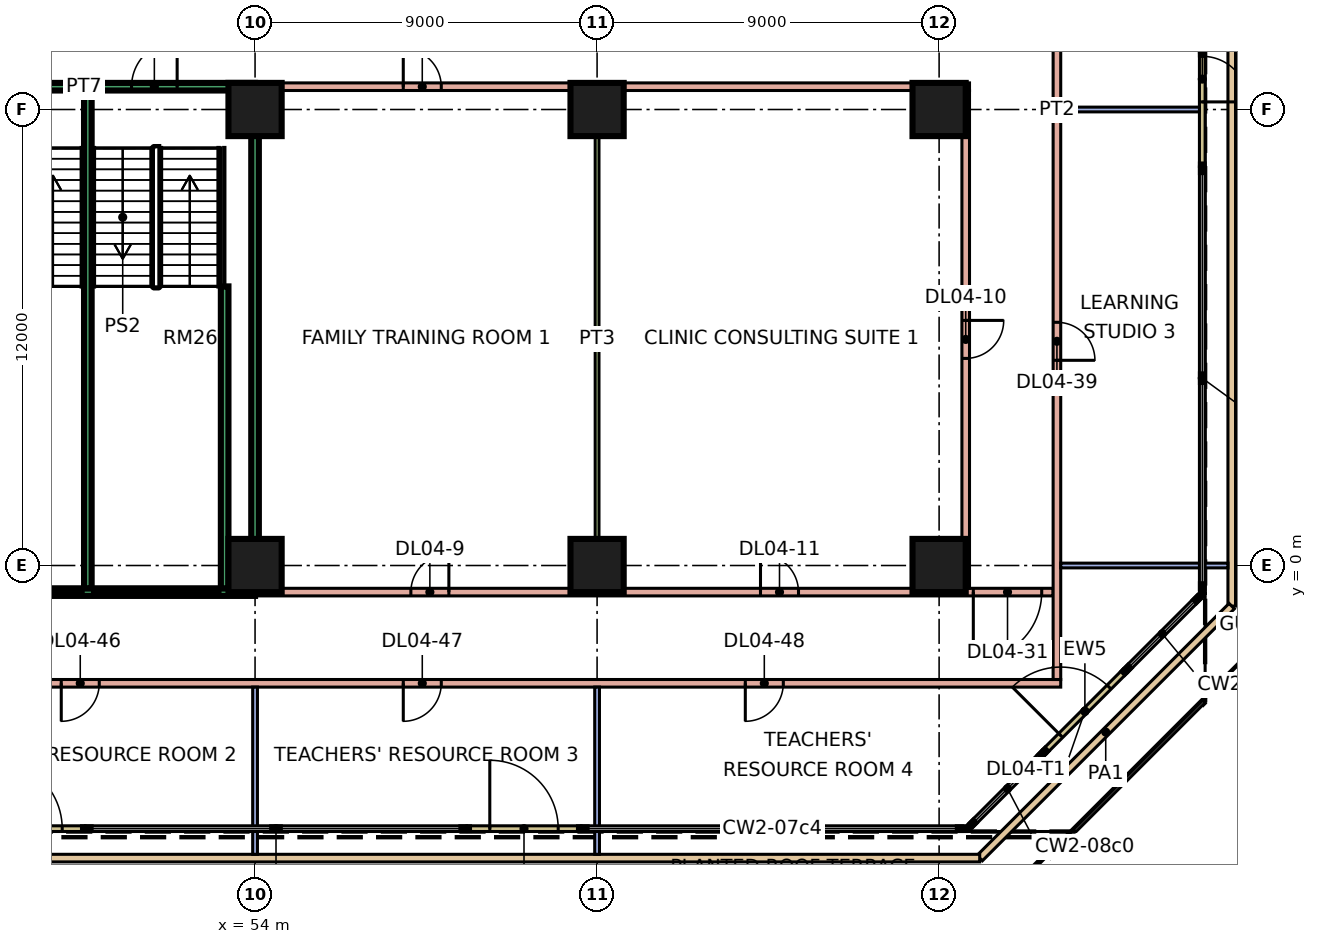
"""IFC4 building model, lengths in metres.
Left out: names, types, materials, properties, quantities, classifications, styles, units other than length and angle.
Written with IfcOpenShell. Run it as: python <this file> out.ifc"""

import sys

from ifc_helpers import new_model, si_unit, direction, frame, frame_2d, origin, origin_2d, place, context, subcontext, project, spatial, rectangle, extrude, element, fill, save


model = new_model("IFC4")
c1 = context("Model", 3, precision=1e-05, world=origin(), true_north=direction((0.0, 1.0)))
c2 = subcontext(c1, "Body", "Model", "MODEL_VIEW")
j1 = project(units=[si_unit("LENGTHUNIT", "METRE"), si_unit("PLANEANGLEUNIT", "RADIAN")], contexts=[c1])
p1 = place(None, origin())
s1 = spatial("IfcSite", under=j1, at=p1, CompositionType="ELEMENT")
p2 = place(p1, origin())
s2 = spatial("IfcBuilding", under=s1, at=p2, CompositionType="ELEMENT")
p3 = place(p2, frame((0.0, 0.0, 21.6)))
s3 = spatial("IfcBuildingStorey", under=s2, at=p3, CompositionType="ELEMENT", Elevation=21.6)
for number, where, z_axis, x_axis in (
    (1, (54.0, 0.0, 0.0), (0.0, 0.0, 1.0), (1.0, 0.0, 0.0)),
    (2, (63.0, 0.0, 0.0), (0.0, 0.0, 1.0), (1.0, 0.0, 0.0)),
    (3, (72.0, 0.0, 0.0), (0.0, 0.0, 1.0), (1.0, 0.0, 0.0)),
    (4, (54.0, 12.0, 0.0), (0.0, 0.0, 1.0), (1.0, 0.0, 0.0)),
    (5, (63.0, 12.0, 0.0), (0.0, 0.0, 1.0), (1.0, 0.0, 0.0)),
    (6, (72.0, 12.0, 0.0), (0.0, 0.0, 1.0), (1.0, 0.0, 0.0)),
):
    element("IfcColumn", number, at=place(p3, frame(where, z_axis=z_axis, x_axis=x_axis)), inside=s3, PredefinedType="COLUMN", context=c2, shape_type="SweptSolid", body=[
        extrude(rectangle(XDim=1.4, YDim=1.4, at=origin_2d()), origin(), (0.0, 0.0, 1.0), 4.8),
    ])
p4 = place(p3, frame((46.526, -6.925, 0.0), z_axis=(0.0, 0.0, 1.0), x_axis=(1.0, 0.0, 0.0)))
e7 = element("IfcWall", 7, at=p4, inside=s3, PredefinedType="SOLIDWALL", context=c2, shape_type="SweptSolid", body=[
    extrude(rectangle(XDim=3.0, YDim=0.15, at=frame_2d((1.5, 0.0))), origin(), (0.0, 0.0, 1.0), 4.4),
])
p5 = place(p4, frame((0.6, 0.0, 0.0)))
e8 = element("IfcOpeningElement", 8, at=p5, cuts=e7, PredefinedType="OPENING", context=c2, shape_type="SweptSolid", body=[
    extrude(rectangle(XDim=1.8, YDim=2.4, at=frame_2d((0.9, 1.2))), frame((0.0, 0.085, 0.0), z_axis=(0.0, -1.0, 0.0), x_axis=(1.0, 0.0, 0.0)), (0.0, 0.0, 1.0), 0.17),
])
p6 = place(p3, frame((59.577, -6.925, 0.0), z_axis=(0.0, 0.0, 1.0), x_axis=(1.0, 0.0, 0.0)))
e9 = element("IfcWall", 9, at=p6, inside=s3, PredefinedType="SOLIDWALL", context=c2, shape_type="SweptSolid", body=[
    extrude(rectangle(XDim=3.0, YDim=0.15, at=frame_2d((1.5, 0.0))), origin(), (0.0, 0.0, 1.0), 4.4),
])
p7 = place(p6, frame((0.6, 0.0, 0.0)))
e10 = element("IfcOpeningElement", 10, at=p7, cuts=e9, PredefinedType="OPENING", context=c2, shape_type="SweptSolid", body=[
    extrude(rectangle(XDim=1.8, YDim=2.4, at=frame_2d((0.9, 1.2))), frame((0.0, 0.085, 0.0), z_axis=(0.0, -1.0, 0.0), x_axis=(1.0, 0.0, 0.0)), (0.0, 0.0, 1.0), 0.17),
])
p8 = place(p3, frame((74.775, -4.897, 0.0), z_axis=(0.0, 0.0, 1.0), x_axis=(0.707106781187, 0.707106781187, 0.0)))
e11 = element("IfcWall", 11, at=p8, inside=s3, PredefinedType="SOLIDWALL", context=c2, shape_type="SweptSolid", body=[
    extrude(rectangle(XDim=3.0, YDim=0.15, at=frame_2d((1.5, 0.0))), origin(), (0.0, 0.0, 1.0), 4.4),
])
p9 = place(p8, frame((0.6, 0.0, 0.0)))
e12 = element("IfcOpeningElement", 12, at=p9, cuts=e11, PredefinedType="OPENING", context=c2, shape_type="SweptSolid", body=[
    extrude(rectangle(XDim=1.8, YDim=2.4, at=frame_2d((0.9, 1.2))), frame((0.0, 0.085, 0.0), z_axis=(0.0, -1.0, 0.0), x_axis=(1.0, 0.0, 0.0)), (0.0, 0.0, 1.0), 0.17),
])
p10 = place(p3, frame((78.925, 10.5, 0.0), z_axis=(0.0, 0.0, 1.0), x_axis=(0.0, 1.0, 0.0)))
e13 = element("IfcWall", 13, at=p10, inside=s3, PredefinedType="SOLIDWALL", context=c2, shape_type="SweptSolid", body=[
    extrude(rectangle(XDim=3.0, YDim=0.15, at=frame_2d((1.5, 0.0))), origin(), (0.0, 0.0, 1.0), 4.4),
])
p11 = place(p10, frame((1.7, 0.0, 0.0)))
e14 = element("IfcOpeningElement", 14, at=p11, cuts=e13, PredefinedType="OPENING", context=c2, shape_type="SweptSolid", body=[
    extrude(rectangle(XDim=1.2, YDim=2.4, at=frame_2d((0.6, 1.2))), frame((0.0, 0.085, 0.0), z_axis=(0.0, -1.0, 0.0), x_axis=(1.0, 0.0, 0.0)), (0.0, 0.0, 1.0), 0.17),
])
p12 = place(p3, frame((79.7, 25.068, 0.0), z_axis=(0.0, 0.0, 1.0), x_axis=(0.0, -1.0, 0.0)))
e15 = element("IfcWall", 15, at=p12, inside=s3, PredefinedType="PARAPET", context=c2, shape_type="SweptSolid", body=[
    extrude(rectangle(XDim=26.136, YDim=0.2, at=frame_2d((13.068, 0.0))), origin(), (0.0, 0.0, 1.0), 0.5),
])
p13 = place(p3, frame((79.7, -1.068, 0.0), z_axis=(0.0, 0.0, 1.0), x_axis=(-0.707106781187, -0.707106781187, 0.0)))
e16 = element("IfcWall", 16, at=p13, inside=s3, PredefinedType="PARAPET", context=c2, shape_type="SweptSolid", body=[
    extrude(rectangle(XDim=9.379, YDim=0.2, at=frame_2d((4.689, 0.0))), origin(), (0.0, 0.0, 1.0), 0.5),
])
p14 = place(p3, frame((73.068, -7.7, 0.0), z_axis=(0.0, 0.0, 1.0), x_axis=(-1.0, 0.0, 0.0)))
e17 = element("IfcWall", 17, at=p14, inside=s3, PredefinedType="PARAPET", context=c2, shape_type="SweptSolid", body=[
    extrude(rectangle(XDim=63.136, YDim=0.2, at=frame_2d((31.568, 0.0))), origin(), (0.0, 0.0, 1.0), 0.5),
])
p15 = place(p3, frame((5.473, -3.1, 0.0), z_axis=(0.0, 0.0, 1.0), x_axis=(1.0, 0.0, 0.0)))
e18 = element("IfcWall", 18, at=p15, inside=s3, PredefinedType="PARTITIONING", context=c2, shape_type="SweptSolid", body=[
    extrude(rectangle(XDim=69.727, YDim=0.2, at=frame_2d((34.863, 0.0))), origin(), (0.0, 0.0, 1.0), 4.4),
])
p16 = place(p15, frame((11.927, 0.0, 0.0)))
e19 = element("IfcOpeningElement", 19, at=p16, cuts=e18, PredefinedType="OPENING", context=c2, shape_type="SweptSolid", body=[
    extrude(rectangle(XDim=1.0, YDim=2.1, at=frame_2d((0.5, 1.05))), frame((0.0, 0.11, 0.0), z_axis=(0.0, -1.0, 0.0), x_axis=(1.0, 0.0, 0.0)), (0.0, 0.0, 1.0), 0.22),
])
p17 = place(p15, frame((23.927, 0.0, 0.0)))
e20 = element("IfcOpeningElement", 20, at=p17, cuts=e18, PredefinedType="OPENING", context=c2, shape_type="SweptSolid", body=[
    extrude(rectangle(XDim=1.0, YDim=2.1, at=frame_2d((0.5, 1.05))), frame((0.0, 0.11, 0.0), z_axis=(0.0, -1.0, 0.0), x_axis=(1.0, 0.0, 0.0)), (0.0, 0.0, 1.0), 0.22),
])
p18 = place(p15, frame((34.427, 0.0, 0.0)))
e21 = element("IfcOpeningElement", 21, at=p18, cuts=e18, PredefinedType="OPENING", context=c2, shape_type="SweptSolid", body=[
    extrude(rectangle(XDim=1.0, YDim=2.1, at=frame_2d((0.5, 1.05))), frame((0.0, 0.11, 0.0), z_axis=(0.0, -1.0, 0.0), x_axis=(1.0, 0.0, 0.0)), (0.0, 0.0, 1.0), 0.22),
])
p19 = place(p15, frame((43.427, 0.0, 0.0)))
e22 = element("IfcOpeningElement", 22, at=p19, cuts=e18, PredefinedType="OPENING", context=c2, shape_type="SweptSolid", body=[
    extrude(rectangle(XDim=1.0, YDim=2.1, at=frame_2d((0.5, 1.05))), frame((0.0, 0.11, 0.0), z_axis=(0.0, -1.0, 0.0), x_axis=(1.0, 0.0, 0.0)), (0.0, 0.0, 1.0), 0.22),
])
p20 = place(p15, frame((52.427, 0.0, 0.0)))
e23 = element("IfcOpeningElement", 23, at=p20, cuts=e18, PredefinedType="OPENING", context=c2, shape_type="SweptSolid", body=[
    extrude(rectangle(XDim=1.0, YDim=2.1, at=frame_2d((0.5, 1.05))), frame((0.0, 0.11, 0.0), z_axis=(0.0, -1.0, 0.0), x_axis=(1.0, 0.0, 0.0)), (0.0, 0.0, 1.0), 0.22),
])
p21 = place(p15, frame((61.427, 0.0, 0.0)))
e24 = element("IfcOpeningElement", 24, at=p21, cuts=e18, PredefinedType="OPENING", context=c2, shape_type="SweptSolid", body=[
    extrude(rectangle(XDim=1.0, YDim=2.1, at=frame_2d((0.5, 1.05))), frame((0.0, 0.11, 0.0), z_axis=(0.0, -1.0, 0.0), x_axis=(1.0, 0.0, 0.0)), (0.0, 0.0, 1.0), 0.22),
])
p22 = place(p3, frame((45.0, -0.7, 0.0), z_axis=(0.0, 0.0, 1.0), x_axis=(1.0, 0.0, 0.0)))
e25 = element("IfcWall", 25, at=p22, inside=s3, PredefinedType="SOLIDWALL", context=c2, shape_type="SweptSolid", body=[
    extrude(rectangle(XDim=9.0, YDim=0.2, at=frame_2d((4.5, 0.0))), origin(), (0.0, 0.0, 1.0), 4.4),
])
p23 = place(p3, frame((45.0, 12.6, 0.0), z_axis=(0.0, 0.0, 1.0), x_axis=(1.0, 0.0, 0.0)))
e26 = element("IfcWall", 26, at=p23, inside=s3, PredefinedType="SOLIDWALL", context=c2, shape_type="SweptSolid", body=[
    extrude(rectangle(XDim=9.0, YDim=0.2, at=frame_2d((4.5, 0.0))), origin(), (0.0, 0.0, 1.0), 4.4),
])
p24 = place(p23, frame((5.75, 0.0, 0.0)))
e27 = element("IfcOpeningElement", 27, at=p24, cuts=e26, PredefinedType="OPENING", context=c2, shape_type="SweptSolid", body=[
    extrude(rectangle(XDim=1.2, YDim=2.1, at=frame_2d((0.6, 1.05))), frame((0.0, 0.11, 0.0), z_axis=(0.0, -1.0, 0.0), x_axis=(1.0, 0.0, 0.0)), (0.0, 0.0, 1.0), 0.22),
])
p25 = place(p23, frame((2.15, 0.0, 0.0)))
e28 = element("IfcOpeningElement", 28, at=p25, cuts=e26, PredefinedType="OPENING", context=c2, shape_type="SweptSolid", body=[
    extrude(rectangle(XDim=1.2, YDim=2.1, at=frame_2d((0.6, 1.05))), frame((0.0, 0.11, 0.0), z_axis=(0.0, -1.0, 0.0), x_axis=(1.0, 0.0, 0.0)), (0.0, 0.0, 1.0), 0.22),
])
p26 = place(p3, frame((49.6, -0.6, 0.0), z_axis=(0.0, 0.0, 1.0), x_axis=(0.0, 1.0, 0.0)))
e29 = element("IfcWall", 29, at=p26, inside=s3, PredefinedType="SOLIDWALL", context=c2, shape_type="SweptSolid", body=[
    extrude(rectangle(XDim=13.1, YDim=0.2, at=frame_2d((6.55, 0.0))), origin(), (0.0, 0.0, 1.0), 4.4),
])
p27 = place(p3, frame((54.0, -7.6, 0.0), z_axis=(0.0, 0.0, 1.0), x_axis=(0.0, 1.0, 0.0)))
e30 = element("IfcWall", 30, at=p27, inside=s3, PredefinedType="PARTITIONING", context=c2, shape_type="SweptSolid", body=[
    extrude(rectangle(XDim=4.4, YDim=0.125, at=frame_2d((2.2, 0.0))), origin(), (0.0, 0.0, 1.0), 4.4),
])
p28 = place(p3, frame((54.0, -0.7, 0.0), z_axis=(0.0, 0.0, 1.0), x_axis=(1.0, 0.0, 0.0)))
e31 = element("IfcWall", 31, at=p28, inside=s3, PredefinedType="PARTITIONING", context=c2, shape_type="SweptSolid", body=[
    extrude(rectangle(XDim=21.0, YDim=0.2, at=frame_2d((10.5, 0.0))), origin(), (0.0, 0.0, 1.0), 4.4),
])
p29 = place(p28, frame((4.1, 0.0, 0.0)))
e32 = element("IfcOpeningElement", 32, at=p29, cuts=e31, PredefinedType="OPENING", context=c2, shape_type="SweptSolid", body=[
    extrude(rectangle(XDim=1.0, YDim=2.1, at=frame_2d((0.5, 1.05))), frame((0.0, 0.11, 0.0), z_axis=(0.0, -1.0, 0.0), x_axis=(1.0, 0.0, 0.0)), (0.0, 0.0, 1.0), 0.22),
])
p30 = place(p28, frame((13.3, 0.0, 0.0)))
e33 = element("IfcOpeningElement", 33, at=p30, cuts=e31, PredefinedType="OPENING", context=c2, shape_type="SweptSolid", body=[
    extrude(rectangle(XDim=1.0, YDim=2.1, at=frame_2d((0.5, 1.05))), frame((0.0, 0.11, 0.0), z_axis=(0.0, -1.0, 0.0), x_axis=(1.0, 0.0, 0.0)), (0.0, 0.0, 1.0), 0.22),
])
p31 = place(p28, frame((18.9, 0.0, 0.0)))
e34 = element("IfcOpeningElement", 34, at=p31, cuts=e31, PredefinedType="OPENING", context=c2, shape_type="SweptSolid", body=[
    extrude(rectangle(XDim=1.8, YDim=2.1, at=frame_2d((0.9, 1.05))), frame((0.0, 0.11, 0.0), z_axis=(0.0, -1.0, 0.0), x_axis=(1.0, 0.0, 0.0)), (0.0, 0.0, 1.0), 0.22),
])
p32 = place(p3, frame((54.0, -0.6, 0.0), z_axis=(0.0, 0.0, 1.0), x_axis=(0.0, 1.0, 0.0)))
e35 = element("IfcWall", 35, at=p32, inside=s3, PredefinedType="SOLIDWALL", context=c2, shape_type="SweptSolid", body=[
    extrude(rectangle(XDim=13.1, YDim=0.2, at=frame_2d((6.55, 0.0))), origin(), (0.0, 0.0, 1.0), 4.4),
])
p33 = place(p3, frame((54.0, 12.6, 0.0), z_axis=(0.0, 0.0, 1.0), x_axis=(1.0, 0.0, 0.0)))
e36 = element("IfcWall", 36, at=p33, inside=s3, PredefinedType="PARTITIONING", context=c2, shape_type="SweptSolid", body=[
    extrude(rectangle(XDim=18.8, YDim=0.2, at=frame_2d((9.4, 0.0))), origin(), (0.0, 0.0, 1.0), 4.4),
])
p34 = place(p33, frame((3.9, 0.0, 0.0)))
e37 = element("IfcOpeningElement", 37, at=p34, cuts=e36, PredefinedType="OPENING", context=c2, shape_type="SweptSolid", body=[
    extrude(rectangle(XDim=1.0, YDim=2.1, at=frame_2d((0.5, 1.05))), frame((0.0, 0.11, 0.0), z_axis=(0.0, -1.0, 0.0), x_axis=(1.0, 0.0, 0.0)), (0.0, 0.0, 1.0), 0.22),
])
p35 = place(p3, frame((63.0, -7.6, 0.0), z_axis=(0.0, 0.0, 1.0), x_axis=(0.0, 1.0, 0.0)))
e38 = element("IfcWall", 38, at=p35, inside=s3, PredefinedType="PARTITIONING", context=c2, shape_type="SweptSolid", body=[
    extrude(rectangle(XDim=4.4, YDim=0.125, at=frame_2d((2.2, 0.0))), origin(), (0.0, 0.0, 1.0), 4.4),
])
p36 = place(p3, frame((63.0, -0.6, 0.0), z_axis=(0.0, 0.0, 1.0), x_axis=(0.0, 1.0, 0.0)))
e39 = element("IfcWall", 39, at=p36, inside=s3, PredefinedType="PARTITIONING", context=c2, shape_type="SweptSolid", body=[
    extrude(rectangle(XDim=13.1, YDim=0.1, at=frame_2d((6.55, 0.0))), origin(), (0.0, 0.0, 1.0), 4.4),
])
p37 = place(p3, frame((72.7, -0.6, 0.0), z_axis=(0.0, 0.0, 1.0), x_axis=(0.0, 1.0, 0.0)))
e40 = element("IfcWall", 40, at=p37, inside=s3, PredefinedType="PARTITIONING", context=c2, shape_type="SweptSolid", body=[
    extrude(rectangle(XDim=13.1, YDim=0.2, at=frame_2d((6.55, 0.0))), origin(), (0.0, 0.0, 1.0), 4.4),
])
p38 = place(p37, frame((6.05, 0.0, 0.0)))
e41 = element("IfcOpeningElement", 41, at=p38, cuts=e40, PredefinedType="OPENING", context=c2, shape_type="SweptSolid", body=[
    extrude(rectangle(XDim=1.0, YDim=2.1, at=frame_2d((0.5, 1.05))), frame((0.0, 0.11, 0.0), z_axis=(0.0, -1.0, 0.0), x_axis=(1.0, 0.0, 0.0)), (0.0, 0.0, 1.0), 0.22),
])
p39 = place(p3, frame((75.1, -3.0, 0.0), z_axis=(0.0, 0.0, 1.0), x_axis=(0.0, 1.0, 0.0)))
e42 = element("IfcWall", 42, at=p39, inside=s3, PredefinedType="PARTITIONING", context=c2, shape_type="SweptSolid", body=[
    extrude(rectangle(XDim=30.0, YDim=0.2, at=frame_2d((15.0, 0.0))), origin(), (0.0, 0.0, 1.0), 4.4),
])
p40 = place(p39, frame((8.4, 0.0, 0.0)))
e43 = element("IfcOpeningElement", 43, at=p40, cuts=e42, PredefinedType="OPENING", context=c2, shape_type="SweptSolid", body=[
    extrude(rectangle(XDim=1.0, YDim=2.1, at=frame_2d((0.5, 1.05))), frame((0.0, 0.11, 0.0), z_axis=(0.0, -1.0, 0.0), x_axis=(1.0, 0.0, 0.0)), (0.0, 0.0, 1.0), 0.22),
])
p41 = place(p39, frame((22.25, 0.0, 0.0)))
e44 = element("IfcOpeningElement", 44, at=p41, cuts=e42, PredefinedType="OPENING", context=c2, shape_type="SweptSolid", body=[
    extrude(rectangle(XDim=1.0, YDim=2.1, at=frame_2d((0.5, 1.05))), frame((0.0, 0.11, 0.0), z_axis=(0.0, -1.0, 0.0), x_axis=(1.0, 0.0, 0.0)), (0.0, 0.0, 1.0), 0.22),
])
p42 = place(p3, frame((75.2, 0.0, 0.0), z_axis=(0.0, 0.0, 1.0), x_axis=(1.0, 0.0, 0.0)))
e45 = element("IfcWall", 45, at=p42, inside=s3, PredefinedType="PARTITIONING", context=c2, shape_type="SweptSolid", body=[
    extrude(rectangle(XDim=4.4, YDim=0.125, at=frame_2d((2.2, 0.0))), origin(), (0.0, 0.0, 1.0), 4.4),
])
p43 = place(p3, frame((75.2, 12.0, 0.0), z_axis=(0.0, 0.0, 1.0), x_axis=(1.0, 0.0, 0.0)))
e46 = element("IfcWall", 46, at=p43, inside=s3, PredefinedType="PARTITIONING", context=c2, shape_type="SweptSolid", body=[
    extrude(rectangle(XDim=3.651, YDim=0.125, at=frame_2d((1.826, 0.0))), origin(), (0.0, 0.0, 1.0), 4.4),
])
p44 = place(p3, frame((53.2, -0.6, 0.0), z_axis=(0.0, 0.0, 1.0), x_axis=(0.0, 1.0, 0.0)))
e47 = element("IfcWall", 47, at=p44, inside=s3, PredefinedType="SOLIDWALL", context=c2, shape_type="SweptSolid", body=[
    extrude(rectangle(XDim=7.945, YDim=0.2, at=frame_2d((3.973, 0.0))), origin(), (0.0, 0.0, 1.0), 4.4),
])
p45 = place(p5, origin())
e48 = element("IfcDoor", 48, at=p45, inside=s3, OperationType="DOUBLE_DOOR_SINGLE_SWING", PredefinedType="DOOR", context=c2, shape_type="SweptSolid", body=[
    extrude(rectangle(XDim=1.8, YDim=2.4, at=frame_2d((0.9, 1.2))), frame((0.0, 0.025, 0.0), z_axis=(0.0, -1.0, 0.0), x_axis=(1.0, 0.0, 0.0)), (0.0, 0.0, 1.0), 0.05),
])
fill(e8, e48)
p46 = place(p7, origin())
e49 = element("IfcDoor", 49, at=p46, inside=s3, OperationType="DOUBLE_DOOR_SINGLE_SWING", PredefinedType="DOOR", context=c2, shape_type="SweptSolid", body=[
    extrude(rectangle(XDim=1.8, YDim=2.4, at=frame_2d((0.9, 1.2))), frame((0.0, 0.025, 0.0), z_axis=(0.0, -1.0, 0.0), x_axis=(1.0, 0.0, 0.0)), (0.0, 0.0, 1.0), 0.05),
])
fill(e10, e49)
p47 = place(p9, origin())
e50 = element("IfcDoor", 50, at=p47, inside=s3, OperationType="DOUBLE_DOOR_SINGLE_SWING", PredefinedType="DOOR", context=c2, shape_type="SweptSolid", body=[
    extrude(rectangle(XDim=1.8, YDim=2.4, at=frame_2d((0.9, 1.2))), frame((0.0, 0.025, 0.0), z_axis=(0.0, -1.0, 0.0), x_axis=(1.0, 0.0, 0.0)), (0.0, 0.0, 1.0), 0.05),
])
fill(e12, e50)
p48 = place(p11, frame((1.2, 0.0, 0.0), z_axis=(0.0, 0.0, 1.0), x_axis=(-1.0, 0.0, 0.0)))
e51 = element("IfcDoor", 51, at=p48, inside=s3, OperationType="DOUBLE_DOOR_SINGLE_SWING", PredefinedType="DOOR", context=c2, shape_type="SweptSolid", body=[
    extrude(rectangle(XDim=1.2, YDim=2.4, at=frame_2d((0.6, 1.2))), frame((0.0, 0.025, 0.0), z_axis=(0.0, -1.0, 0.0), x_axis=(1.0, 0.0, 0.0)), (0.0, 0.0, 1.0), 0.05),
])
fill(e14, e51)
p49 = place(p34, origin())
e52 = element("IfcDoor", 52, at=p49, inside=s3, OperationType="SINGLE_SWING_LEFT", PredefinedType="DOOR", context=c2, shape_type="SweptSolid", body=[
    extrude(rectangle(XDim=1.0, YDim=2.1, at=frame_2d((0.5, 1.05))), frame((0.0, 0.025, 0.0), z_axis=(0.0, -1.0, 0.0), x_axis=(1.0, 0.0, 0.0)), (0.0, 0.0, 1.0), 0.05),
])
fill(e37, e52)
p50 = place(p29, frame((1.0, 0.0, 0.0), z_axis=(0.0, 0.0, 1.0), x_axis=(-1.0, 0.0, 0.0)))
e53 = element("IfcDoor", 53, at=p50, inside=s3, OperationType="SINGLE_SWING_RIGHT", PredefinedType="DOOR", context=c2, shape_type="SweptSolid", body=[
    extrude(rectangle(XDim=1.0, YDim=2.1, at=frame_2d((0.5, 1.05))), frame((0.0, 0.025, 0.0), z_axis=(0.0, -1.0, 0.0), x_axis=(1.0, 0.0, 0.0)), (0.0, 0.0, 1.0), 0.05),
])
fill(e32, e53)
p51 = place(p38, origin())
e54 = element("IfcDoor", 54, at=p51, inside=s3, OperationType="SINGLE_SWING_RIGHT", PredefinedType="DOOR", context=c2, shape_type="SweptSolid", body=[
    extrude(rectangle(XDim=1.0, YDim=2.1, at=frame_2d((0.5, 1.05))), frame((0.0, 0.025, 0.0), z_axis=(0.0, -1.0, 0.0), x_axis=(1.0, 0.0, 0.0)), (0.0, 0.0, 1.0), 0.05),
])
fill(e41, e54)
p52 = place(p30, origin())
e55 = element("IfcDoor", 55, at=p52, inside=s3, OperationType="SINGLE_SWING_LEFT", PredefinedType="DOOR", context=c2, shape_type="SweptSolid", body=[
    extrude(rectangle(XDim=1.0, YDim=2.1, at=frame_2d((0.5, 1.05))), frame((0.0, 0.025, 0.0), z_axis=(0.0, -1.0, 0.0), x_axis=(1.0, 0.0, 0.0)), (0.0, 0.0, 1.0), 0.05),
])
fill(e33, e55)
p53 = place(p31, frame((1.8, 0.0, 0.0), z_axis=(0.0, 0.0, 1.0), x_axis=(-1.0, 0.0, 0.0)))
e56 = element("IfcDoor", 56, at=p53, inside=s3, OperationType="DOUBLE_DOOR_SINGLE_SWING", PredefinedType="DOOR", context=c2, shape_type="SweptSolid", body=[
    extrude(rectangle(XDim=1.8, YDim=2.1, at=frame_2d((0.9, 1.05))), frame((0.0, 0.025, 0.0), z_axis=(0.0, -1.0, 0.0), x_axis=(1.0, 0.0, 0.0)), (0.0, 0.0, 1.0), 0.05),
])
fill(e34, e56)
p54 = place(p40, frame((1.0, 0.0, 0.0), z_axis=(0.0, 0.0, 1.0), x_axis=(-1.0, 0.0, 0.0)))
e57 = element("IfcDoor", 57, at=p54, inside=s3, OperationType="SINGLE_SWING_LEFT", PredefinedType="DOOR", context=c2, shape_type="SweptSolid", body=[
    extrude(rectangle(XDim=1.0, YDim=2.1, at=frame_2d((0.5, 1.05))), frame((0.0, 0.025, 0.0), z_axis=(0.0, -1.0, 0.0), x_axis=(1.0, 0.0, 0.0)), (0.0, 0.0, 1.0), 0.05),
])
fill(e43, e57)
p55 = place(p19, frame((1.0, 0.0, 0.0), z_axis=(0.0, 0.0, 1.0), x_axis=(-1.0, 0.0, 0.0)))
e58 = element("IfcDoor", 58, at=p55, inside=s3, OperationType="SINGLE_SWING_LEFT", PredefinedType="DOOR", context=c2, shape_type="SweptSolid", body=[
    extrude(rectangle(XDim=1.0, YDim=2.1, at=frame_2d((0.5, 1.05))), frame((0.0, 0.025, 0.0), z_axis=(0.0, -1.0, 0.0), x_axis=(1.0, 0.0, 0.0)), (0.0, 0.0, 1.0), 0.05),
])
fill(e22, e58)
p56 = place(p20, frame((1.0, 0.0, 0.0), z_axis=(0.0, 0.0, 1.0), x_axis=(-1.0, 0.0, 0.0)))
e59 = element("IfcDoor", 59, at=p56, inside=s3, OperationType="SINGLE_SWING_LEFT", PredefinedType="DOOR", context=c2, shape_type="SweptSolid", body=[
    extrude(rectangle(XDim=1.0, YDim=2.1, at=frame_2d((0.5, 1.05))), frame((0.0, 0.025, 0.0), z_axis=(0.0, -1.0, 0.0), x_axis=(1.0, 0.0, 0.0)), (0.0, 0.0, 1.0), 0.05),
])
fill(e23, e59)
p57 = place(p21, frame((1.0, 0.0, 0.0), z_axis=(0.0, 0.0, 1.0), x_axis=(-1.0, 0.0, 0.0)))
e60 = element("IfcDoor", 60, at=p57, inside=s3, OperationType="SINGLE_SWING_LEFT", PredefinedType="DOOR", context=c2, shape_type="SweptSolid", body=[
    extrude(rectangle(XDim=1.0, YDim=2.1, at=frame_2d((0.5, 1.05))), frame((0.0, 0.025, 0.0), z_axis=(0.0, -1.0, 0.0), x_axis=(1.0, 0.0, 0.0)), (0.0, 0.0, 1.0), 0.05),
])
fill(e24, e60)
p58 = place(p24, frame((1.2, 0.0, 0.0), z_axis=(0.0, 0.0, 1.0), x_axis=(-1.0, 0.0, 0.0)))
e61 = element("IfcDoor", 61, at=p58, inside=s3, OperationType="SINGLE_SWING_RIGHT", PredefinedType="DOOR", context=c2, shape_type="SweptSolid", body=[
    extrude(rectangle(XDim=1.2, YDim=2.1, at=frame_2d((0.6, 1.05))), frame((0.0, 0.025, 0.0), z_axis=(0.0, -1.0, 0.0), x_axis=(1.0, 0.0, 0.0)), (0.0, 0.0, 1.0), 0.05),
])
fill(e27, e61)
save(model, sys.argv[1])
